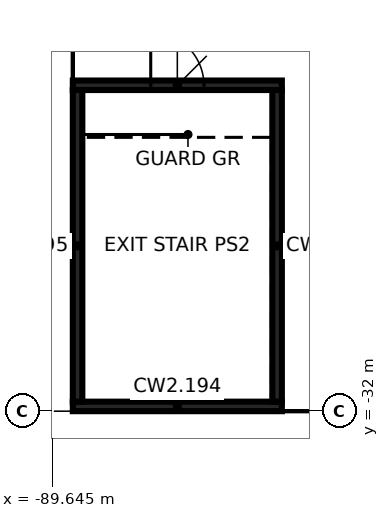
"""IFC4 building model, lengths in metres.
Left out: names, types, materials, properties, quantities, classifications, styles, units other than length and angle.
Written with IfcOpenShell. Run it as: python <this file> out.ifc"""

import sys

from ifc_helpers import new_model, si_unit, direction, frame, frame_2d, origin, place, context, subcontext, project, spatial, rectangle, extrude, element, fill, save


model = new_model("IFC4")
c1 = context("Model", 3, precision=1e-05, world=origin(), true_north=direction((0.0, 1.0)))
c2 = subcontext(c1, "Body", "Model", "MODEL_VIEW")
j1 = project(units=[si_unit("LENGTHUNIT", "METRE"), si_unit("PLANEANGLEUNIT", "RADIAN")], contexts=[c1])
p1 = place(None, origin())
s1 = spatial("IfcSite", under=j1, at=p1, CompositionType="ELEMENT")
p2 = place(p1, origin())
s2 = spatial("IfcBuilding", under=s1, at=p2, CompositionType="ELEMENT")
p3 = place(p2, frame((0.0, 0.0, 19.5)))
s3 = spatial("IfcBuildingStorey", under=s2, at=p3, CompositionType="ELEMENT", Elevation=19.5)
p4 = place(p3, frame((-89.1, -31.875, 0.0), z_axis=(0.0, 0.0, 1.0), x_axis=(1.0, 0.0, 0.0)))
e1 = element("IfcWall", 1, at=p4, inside=s3, PredefinedType="SHEAR", context=c2, shape_type="SweptSolid", body=[
    extrude(rectangle(XDim=5.5, YDim=0.25, at=frame_2d((2.75, 0.0))), origin(), (0.0, 0.0, 1.0), 4.55),
])
p5 = place(p3, frame((-89.1, -23.425, 0.0), z_axis=(0.0, 0.0, 1.0), x_axis=(1.0, 0.0, 0.0)))
e2 = element("IfcWall", 2, at=p5, inside=s3, PredefinedType="SHEAR", context=c2, shape_type="SweptSolid", body=[
    extrude(rectangle(XDim=5.5, YDim=0.25, at=frame_2d((2.75, 0.0))), origin(), (0.0, 0.0, 1.0), 4.55),
])
p6 = place(p5, frame((2.05, 0.0, 0.0)))
e3 = element("IfcOpeningElement", 3, at=p6, cuts=e2, PredefinedType="OPENING", context=c2, shape_type="SweptSolid", body=[
    extrude(rectangle(XDim=1.4, YDim=2.1, at=frame_2d((0.7, 1.05))), frame((0.0, 0.135, 0.0), z_axis=(0.0, -1.0, 0.0), x_axis=(1.0, 0.0, 0.0)), (0.0, 0.0, 1.0), 0.27),
])
for number, where, z_axis, x_axis in (
    (4, (-88.975, -31.75, 0.0), (0.0, 0.0, 1.0), (0.0, 1.0, 0.0)),
    (5, (-83.725, -31.75, 0.0), (0.0, 0.0, 1.0), (0.0, 1.0, 0.0)),
):
    element("IfcWall", number, at=place(p3, frame(where, z_axis=z_axis, x_axis=x_axis)), inside=s3, PredefinedType="SHEAR", context=c2, shape_type="SweptSolid", body=[
        extrude(rectangle(XDim=8.2, YDim=0.25, at=frame_2d((4.1, 0.0))), origin(), (0.0, 0.0, 1.0), 4.55),
    ])
p7 = place(p6, origin())
e6 = element("IfcDoor", 6, at=p7, inside=s3, OperationType="SINGLE_SWING_LEFT", PredefinedType="DOOR", context=c2, shape_type="SweptSolid", body=[
    extrude(rectangle(XDim=1.4, YDim=2.1, at=frame_2d((0.7, 1.05))), frame((0.0, 0.025, 0.0), z_axis=(0.0, -1.0, 0.0), x_axis=(1.0, 0.0, 0.0)), (0.0, 0.0, 1.0), 0.05),
])
fill(e3, e6)
save(model, sys.argv[1])
